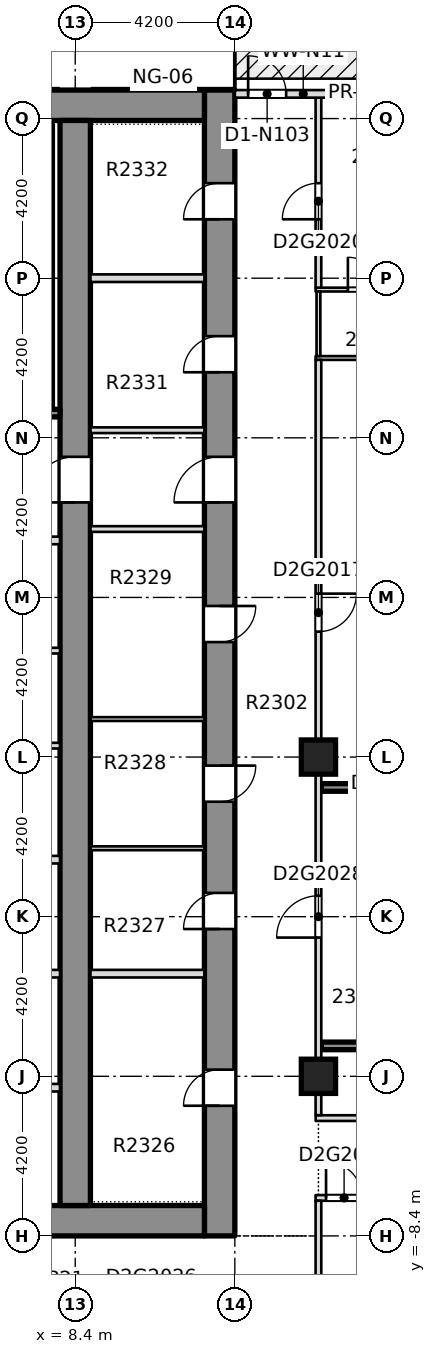
"""IFC4 building model, lengths in metres.
Left out: names, types, materials, properties, quantities, classifications, styles, units other than length and angle.
Written with IfcOpenShell. Run it as: python <this file> out.ifc"""

import sys

from ifc_helpers import new_model, si_unit, direction, frame, frame_2d, origin, origin_2d, place, context, subcontext, project, spatial, rectangle, extrude, element, fill, save


model = new_model("IFC4")
c1 = context("Model", 3, precision=1e-05, world=origin(), true_north=direction((0.0, 1.0)))
c2 = subcontext(c1, "Body", "Model", "MODEL_VIEW")
j1 = project(units=[si_unit("LENGTHUNIT", "METRE"), si_unit("PLANEANGLEUNIT", "RADIAN")], contexts=[c1])
p1 = place(None, origin())
s1 = spatial("IfcSite", under=j1, at=p1, CompositionType="ELEMENT")
p2 = place(p1, origin())
s2 = spatial("IfcBuilding", under=s1, at=p2, CompositionType="ELEMENT")
p3 = place(p2, frame((0.0, 0.0, 94.2)))
s3 = spatial("IfcBuildingStorey", under=s2, at=p3, CompositionType="ELEMENT", Elevation=94.2)
p4 = place(p3, frame((12.2, -8.4, -0.32), z_axis=(0.0, 0.0, 1.0), x_axis=(0.0, 1.0, 0.0)))
e1 = element("IfcWall", 1, at=p4, inside=s3, PredefinedType="SHEAR", context=c2, shape_type="SweptSolid", body=[
    extrude(rectangle(XDim=30.15, YDim=0.8, at=frame_2d((15.075, 0.0))), origin(), (0.0, 0.0, 1.0), 3.45),
])
p5 = place(p4, frame((3.425, 0.0, 0.32)))
e2 = element("IfcOpeningElement", 2, at=p5, cuts=e1, PredefinedType="OPENING", context=c2, shape_type="SweptSolid", body=[
    extrude(rectangle(XDim=0.95, YDim=2.1, at=frame_2d((0.475, 1.05))), frame((0.0, 0.41, 0.0), z_axis=(0.0, -1.0, 0.0), x_axis=(1.0, 0.0, 0.0)), (0.0, 0.0, 1.0), 0.82),
])
p6 = place(p4, frame((8.075, 0.0, 0.32)))
e3 = element("IfcOpeningElement", 3, at=p6, cuts=e1, PredefinedType="OPENING", context=c2, shape_type="SweptSolid", body=[
    extrude(rectangle(XDim=0.95, YDim=2.1, at=frame_2d((0.475, 1.05))), frame((0.0, 0.41, 0.0), z_axis=(0.0, -1.0, 0.0), x_axis=(1.0, 0.0, 0.0)), (0.0, 0.0, 1.0), 0.82),
])
p7 = place(p4, frame((11.425, 0.0, 0.32)))
e4 = element("IfcOpeningElement", 4, at=p7, cuts=e1, PredefinedType="OPENING", context=c2, shape_type="SweptSolid", body=[
    extrude(rectangle(XDim=0.95, YDim=2.1, at=frame_2d((0.475, 1.05))), frame((0.0, 0.41, 0.0), z_axis=(0.0, -1.0, 0.0), x_axis=(1.0, 0.0, 0.0)), (0.0, 0.0, 1.0), 0.82),
])
p8 = place(p4, frame((15.625, 0.0, 0.32)))
e5 = element("IfcOpeningElement", 5, at=p8, cuts=e1, PredefinedType="OPENING", context=c2, shape_type="SweptSolid", body=[
    extrude(rectangle(XDim=0.95, YDim=2.1, at=frame_2d((0.475, 1.05))), frame((0.0, 0.41, 0.0), z_axis=(0.0, -1.0, 0.0), x_axis=(1.0, 0.0, 0.0)), (0.0, 0.0, 1.0), 0.82),
])
p9 = place(p4, frame((22.725, 0.0, 0.32)))
e6 = element("IfcOpeningElement", 6, at=p9, cuts=e1, PredefinedType="OPENING", context=c2, shape_type="SweptSolid", body=[
    extrude(rectangle(XDim=0.95, YDim=2.1, at=frame_2d((0.475, 1.05))), frame((0.0, 0.41, 0.0), z_axis=(0.0, -1.0, 0.0), x_axis=(1.0, 0.0, 0.0)), (0.0, 0.0, 1.0), 0.82),
])
p10 = place(p4, frame((26.75, 0.0, 0.32)))
e7 = element("IfcOpeningElement", 7, at=p10, cuts=e1, PredefinedType="OPENING", context=c2, shape_type="SweptSolid", body=[
    extrude(rectangle(XDim=0.95, YDim=2.1, at=frame_2d((0.475, 1.05))), frame((0.0, 0.41, 0.0), z_axis=(0.0, -1.0, 0.0), x_axis=(1.0, 0.0, 0.0)), (0.0, 0.0, 1.0), 0.82),
])
p11 = place(p4, frame((19.3, 0.0, 0.32)))
e8 = element("IfcOpeningElement", 8, at=p11, cuts=e1, PredefinedType="OPENING", context=c2, shape_type="SweptSolid", body=[
    extrude(rectangle(XDim=1.2, YDim=2.1, at=frame_2d((0.6, 1.05))), frame((0.0, 0.41, 0.0), z_axis=(0.0, -1.0, 0.0), x_axis=(1.0, 0.0, 0.0)), (0.0, 0.0, 1.0), 0.82),
])
p12 = place(p3, frame((-11.8, -8.0, -0.32), z_axis=(0.0, 0.0, 1.0), x_axis=(1.0, 0.0, 0.0)))
e9 = element("IfcWall", 9, at=p12, inside=s3, PredefinedType="SHEAR", context=c2, shape_type="SweptSolid", body=[
    extrude(rectangle(XDim=23.6, YDim=0.8, at=frame_2d((11.8, 0.0))), origin(), (0.0, 0.0, 1.0), 3.45),
])
p13 = place(p12, frame((7.05, 0.0, 0.32)))
e10 = element("IfcOpeningElement", 10, at=p13, cuts=e9, PredefinedType="OPENING", context=c2, shape_type="SweptSolid", body=[
    extrude(rectangle(XDim=1.8, YDim=2.1, at=frame_2d((0.9, 1.05))), frame((0.0, 0.41, 0.0), z_axis=(0.0, -1.0, 0.0), x_axis=(1.0, 0.0, 0.0)), (0.0, 0.0, 1.0), 0.82),
])
p14 = place(p12, frame((14.75, 0.0, 0.32)))
e11 = element("IfcOpeningElement", 11, at=p14, cuts=e9, PredefinedType="OPENING", context=c2, shape_type="SweptSolid", body=[
    extrude(rectangle(XDim=1.8, YDim=2.1, at=frame_2d((0.9, 1.05))), frame((0.0, 0.41, 0.0), z_axis=(0.0, -1.0, 0.0), x_axis=(1.0, 0.0, 0.0)), (0.0, 0.0, 1.0), 0.82),
])
p15 = place(p3, frame((-11.8, 21.35, -0.32), z_axis=(0.0, 0.0, 1.0), x_axis=(1.0, 0.0, 0.0)))
e12 = element("IfcWall", 12, at=p15, inside=s3, PredefinedType="SHEAR", context=c2, shape_type="SweptSolid", body=[
    extrude(rectangle(XDim=23.6, YDim=0.8, at=frame_2d((11.8, 0.0))), origin(), (0.0, 0.0, 1.0), 3.45),
])
p16 = place(p3, frame((8.4, -7.6, -0.32), z_axis=(0.0, 0.0, 1.0), x_axis=(0.0, 1.0, 0.0)))
e13 = element("IfcWall", 13, at=p16, inside=s3, PredefinedType="SHEAR", context=c2, shape_type="SweptSolid", body=[
    extrude(rectangle(XDim=28.55, YDim=0.8, at=frame_2d((14.275, 0.0))), origin(), (0.0, 0.0, 1.0), 3.45),
])
p17 = place(p16, frame((18.5, 0.0, 0.32)))
e14 = element("IfcOpeningElement", 14, at=p17, cuts=e13, PredefinedType="OPENING", context=c2, shape_type="SweptSolid", body=[
    extrude(rectangle(XDim=1.2, YDim=2.1, at=frame_2d((0.6, 1.05))), frame((0.0, 0.41, 0.0), z_axis=(0.0, -1.0, 0.0), x_axis=(1.0, 0.0, 0.0)), (0.0, 0.0, 1.0), 0.82),
])
for number, where, z_axis, x_axis in (
    (15, (14.8, -4.2, -0.32), (0.0, 0.0, 1.0), (1.0, 0.0, 0.0)),
    (16, (14.8, 4.2, -0.32), (0.0, 0.0, 1.0), (1.0, 0.0, 0.0)),
):
    element("IfcColumn", number, at=place(p3, frame(where, z_axis=z_axis, x_axis=x_axis)), inside=s3, PredefinedType="COLUMN", context=c2, shape_type="SweptSolid", body=[
        extrude(rectangle(XDim=0.9, YDim=0.9, at=origin_2d()), origin(), (0.0, 0.0, 1.0), 3.45),
    ])
p18 = place(p3, frame((14.725, -7.4, 0.0), z_axis=(0.0, 0.0, 1.0), x_axis=(1.0, 0.0, 0.0)))
e17 = element("IfcWall", 17, at=p18, inside=s3, PredefinedType="PARTITIONING", context=c2, shape_type="SweptSolid", body=[
    extrude(rectangle(XDim=11.025, YDim=0.15, at=frame_2d((5.512, 0.0))), origin(), (0.0, 0.0, 1.0), 3.13),
])
p19 = place(p18, frame((0.275, 0.0, 0.0)))
e18 = element("IfcOpeningElement", 18, at=p19, cuts=e17, PredefinedType="OPENING", context=c2, shape_type="SweptSolid", body=[
    extrude(rectangle(XDim=0.95, YDim=2.1, at=frame_2d((0.475, 1.05))), frame((0.0, 0.085, 0.0), z_axis=(0.0, -1.0, 0.0), x_axis=(1.0, 0.0, 0.0)), (0.0, 0.0, 1.0), 0.17),
])
p20 = place(p3, frame((14.727, -5.3, 0.0), z_axis=(0.0, 0.0, 1.0), x_axis=(1.0, 0.0, 0.0)))
e19 = element("IfcWall", 19, at=p20, inside=s3, PredefinedType="PARTITIONING", context=c2, shape_type="SweptSolid", body=[
    extrude(rectangle(XDim=11.023, YDim=0.15, at=frame_2d((5.511, 0.0))), origin(), (0.0, 0.0, 1.0), 3.13),
])
p21 = place(p3, frame((14.877, -3.4, 0.0), z_axis=(0.0, 0.0, 1.0), x_axis=(1.0, 0.0, 0.0)))
e20 = element("IfcWall", 20, at=p21, inside=s3, PredefinedType="SOLIDWALL", context=c2, shape_type="SweptSolid", body=[
    extrude(rectangle(XDim=5.571, YDim=0.2, at=frame_2d((2.786, 0.0))), origin(), (0.0, 0.0, 1.0), 3.13),
])
p22 = place(p3, frame((14.875, 3.4, 0.0), z_axis=(0.0, 0.0, 1.0), x_axis=(1.0, 0.0, 0.0)))
e21 = element("IfcWall", 21, at=p22, inside=s3, PredefinedType="SOLIDWALL", context=c2, shape_type="SweptSolid", body=[
    extrude(rectangle(XDim=5.575, YDim=0.2, at=frame_2d((2.788, 0.0))), origin(), (0.0, 0.0, 1.0), 3.13),
])
p23 = place(p3, frame((14.725, 14.7, 0.0), z_axis=(0.0, 0.0, 1.0), x_axis=(1.0, 0.0, 0.0)))
e22 = element("IfcWall", 22, at=p23, inside=s3, PredefinedType="PARTITIONING", context=c2, shape_type="SweptSolid", body=[
    extrude(rectangle(XDim=2.525, YDim=0.1, at=frame_2d((1.262, 0.0))), origin(), (0.0, 0.0, 1.0), 3.13),
])
p24 = place(p3, frame((14.725, 16.5, 0.0), z_axis=(0.0, 0.0, 1.0), x_axis=(1.0, 0.0, 0.0)))
e23 = element("IfcWall", 23, at=p24, inside=s3, PredefinedType="PARTITIONING", context=c2, shape_type="SweptSolid", body=[
    extrude(rectangle(XDim=2.525, YDim=0.1, at=frame_2d((1.262, 0.0))), origin(), (0.0, 0.0, 1.0), 3.13),
])
p25 = place(p24, frame((0.85, 0.0, 0.0)))
e24 = element("IfcOpeningElement", 24, at=p25, cuts=e23, PredefinedType="OPENING", context=c2, shape_type="SweptSolid", body=[
    extrude(rectangle(XDim=0.85, YDim=2.1, at=frame_2d((0.425, 1.05))), frame((0.0, 0.06, 0.0), z_axis=(0.0, -1.0, 0.0), x_axis=(1.0, 0.0, 0.0)), (0.0, 0.0, 1.0), 0.12),
])
p26 = place(p3, frame((14.8, -10.6, 0.0), z_axis=(0.0, 0.0, 1.0), x_axis=(0.0, 1.0, 0.0)))
e25 = element("IfcWall", 25, at=p26, inside=s3, PredefinedType="PARTITIONING", context=c2, shape_type="SweptSolid", body=[
    extrude(rectangle(XDim=3.125, YDim=0.15, at=frame_2d((1.562, 0.0))), origin(), (0.0, 0.0, 1.0), 3.13),
])
p27 = place(p3, frame((14.8, -5.223, 0.0), z_axis=(0.0, 0.0, 1.0), x_axis=(0.0, 1.0, 0.0)))
e26 = element("IfcWall", 26, at=p27, inside=s3, PredefinedType="PARTITIONING", context=c2, shape_type="SweptSolid", body=[
    extrude(rectangle(XDim=19.873, YDim=0.15, at=frame_2d((9.937, 0.0))), origin(), (0.0, 0.0, 1.0), 3.13),
])
p28 = place(p27, frame((12.723, 0.0, 0.0)))
e27 = element("IfcOpeningElement", 27, at=p28, cuts=e26, PredefinedType="OPENING", context=c2, shape_type="SweptSolid", body=[
    extrude(rectangle(XDim=1.0, YDim=2.1, at=frame_2d((0.5, 1.05))), frame((0.0, 0.085, 0.0), z_axis=(0.0, -1.0, 0.0), x_axis=(1.0, 0.0, 0.0)), (0.0, 0.0, 1.0), 0.17),
])
p29 = place(p27, frame((4.673, 0.0, 0.0)))
e28 = element("IfcOpeningElement", 28, at=p29, cuts=e26, PredefinedType="OPENING", context=c2, shape_type="SweptSolid", body=[
    extrude(rectangle(XDim=1.1, YDim=2.1, at=frame_2d((0.55, 1.05))), frame((0.0, 0.085, 0.0), z_axis=(0.0, -1.0, 0.0), x_axis=(1.0, 0.0, 0.0)), (0.0, 0.0, 1.0), 0.17),
])
p30 = place(p3, frame((14.8, 14.75, 0.0), z_axis=(0.0, 0.0, 1.0), x_axis=(0.0, 1.0, 0.0)))
e29 = element("IfcWall", 29, at=p30, inside=s3, PredefinedType="PARTITIONING", context=c2, shape_type="SweptSolid", body=[
    extrude(rectangle(XDim=1.7, YDim=0.1, at=frame_2d((0.85, 0.0))), origin(), (0.0, 0.0, 1.0), 3.13),
])
p31 = place(p3, frame((14.8, 16.55, 0.0), z_axis=(0.0, 0.0, 1.0), x_axis=(0.0, 1.0, 0.0)))
e30 = element("IfcWall", 30, at=p31, inside=s3, PredefinedType="PARTITIONING", context=c2, shape_type="SweptSolid", body=[
    extrude(rectangle(XDim=5.0, YDim=0.15, at=frame_2d((2.5, 0.0))), origin(), (0.0, 0.0, 1.0), 3.13),
])
p32 = place(p31, frame((1.8, 0.0, 0.0)))
e31 = element("IfcOpeningElement", 31, at=p32, cuts=e30, PredefinedType="OPENING", context=c2, shape_type="SweptSolid", body=[
    extrude(rectangle(XDim=0.95, YDim=2.1, at=frame_2d((0.475, 1.05))), frame((0.0, 0.085, 0.0), z_axis=(0.0, -1.0, 0.0), x_axis=(1.0, 0.0, 0.0)), (0.0, 0.0, 1.0), 0.17),
])
p33 = place(p3, frame((16.2, 21.65, 0.0), z_axis=(0.0, 0.0, 1.0), x_axis=(-1.0, 0.0, 0.0)))
e32 = element("IfcWall", 32, at=p33, inside=s3, PredefinedType="STANDARD", context=c2, shape_type="SweptSolid", body=[
    extrude(rectangle(XDim=3.6, YDim=0.2, at=frame_2d((1.8, 0.0))), origin(), (0.0, 0.0, 1.0), 3.13),
])
p34 = place(p33, frame((2.25, 0.0, 0.0)))
e33 = element("IfcOpeningElement", 33, at=p34, cuts=e32, PredefinedType="OPENING", context=c2, shape_type="SweptSolid", body=[
    extrude(rectangle(XDim=1.0, YDim=2.4, at=frame_2d((0.5, 1.2))), frame((0.0, 0.11, 0.0), z_axis=(0.0, -1.0, 0.0), x_axis=(1.0, 0.0, 0.0)), (0.0, 0.0, 1.0), 0.22),
])
for number, where, z_axis, x_axis in (
    (34, (5.575, -4.5, 0.0), (0.0, 0.0, 1.0), (1.0, 0.0, 0.0)),
    (35, (5.575, -1.5, 0.0), (0.0, 0.0, 1.0), (1.0, 0.0, 0.0)),
    (36, (5.575, 1.5, 0.0), (0.0, 0.0, 1.0), (1.0, 0.0, 0.0)),
):
    element("IfcWall", number, at=place(p3, frame(where, z_axis=z_axis, x_axis=x_axis)), inside=s3, PredefinedType="PARTITIONING", context=c2, shape_type="SweptSolid", body=[
        extrude(rectangle(XDim=2.424, YDim=0.2, at=frame_2d((1.212, 0.0))), origin(), (0.0, 0.0, 1.0), 3.13),
    ])
p35 = place(p3, frame((5.425, 4.5, 0.0), z_axis=(0.0, 0.0, 1.0), x_axis=(1.0, 0.0, 0.0)))
e37 = element("IfcWall", 37, at=p35, inside=s3, PredefinedType="PARTITIONING", context=c2, shape_type="SweptSolid", body=[
    extrude(rectangle(XDim=2.574, YDim=0.15, at=frame_2d((1.287, 0.0))), origin(), (0.0, 0.0, 1.0), 3.13),
])
p36 = place(p3, frame((-7.999, 7.0, 0.0), z_axis=(0.0, 0.0, 1.0), x_axis=(1.0, 0.0, 0.0)))
e38 = element("IfcWall", 38, at=p36, inside=s3, PredefinedType="PARTITIONING", context=c2, shape_type="SweptSolid", body=[
    extrude(rectangle(XDim=15.998, YDim=0.15, at=frame_2d((7.999, 0.0))), origin(), (0.0, 0.0, 1.0), 3.13),
])
p37 = place(p36, frame((7.299, 0.0, 0.0)))
e39 = element("IfcOpeningElement", 39, at=p37, cuts=e38, PredefinedType="OPENING", context=c2, shape_type="SweptSolid", body=[
    extrude(rectangle(XDim=1.4, YDim=2.1, at=frame_2d((0.7, 1.05))), frame((0.0, 0.085, 0.0), z_axis=(0.0, -1.0, 0.0), x_axis=(1.0, 0.0, 0.0)), (0.0, 0.0, 1.0), 0.17),
])
p38 = place(p3, frame((3.6, 9.9, 0.0), z_axis=(0.0, 0.0, 1.0), x_axis=(1.0, 0.0, 0.0)))
e40 = element("IfcWall", 40, at=p38, inside=s3, PredefinedType="PARTITIONING", context=c2, shape_type="SweptSolid", body=[
    extrude(rectangle(XDim=4.399, YDim=0.2, at=frame_2d((2.199, 0.0))), origin(), (0.0, 0.0, 1.0), 3.13),
])
p39 = place(p38, frame((2.25, 0.0, 0.0)))
e41 = element("IfcOpeningElement", 41, at=p39, cuts=e40, PredefinedType="OPENING", context=c2, shape_type="SweptSolid", body=[
    extrude(rectangle(XDim=1.1, YDim=2.1, at=frame_2d((0.55, 1.05))), frame((0.0, 0.11, 0.0), z_axis=(0.0, -1.0, 0.0), x_axis=(1.0, 0.0, 0.0)), (0.0, 0.0, 1.0), 0.22),
])
p40 = place(p3, frame((3.425, 13.25, 0.0), z_axis=(0.0, 0.0, 1.0), x_axis=(1.0, 0.0, 0.0)))
e42 = element("IfcWall", 42, at=p40, inside=s3, PredefinedType="SOLIDWALL", context=c2, shape_type="SweptSolid", body=[
    extrude(rectangle(XDim=4.574, YDim=0.2, at=frame_2d((2.287, 0.0))), origin(), (0.0, 0.0, 1.0), 3.13),
])
p41 = place(p40, frame((1.825, 0.0, 0.0)))
e43 = element("IfcOpeningElement", 43, at=p41, cuts=e42, PredefinedType="OPENING", context=c2, shape_type="SweptSolid", body=[
    extrude(rectangle(XDim=1.2, YDim=2.1, at=frame_2d((0.6, 1.05))), frame((0.0, 0.11, 0.0), z_axis=(0.0, -1.0, 0.0), x_axis=(1.0, 0.0, 0.0)), (0.0, 0.0, 1.0), 0.22),
])
p42 = place(p3, frame((8.801, -1.5, 0.0), z_axis=(0.0, 0.0, 1.0), x_axis=(1.0, 0.0, 0.0)))
e44 = element("IfcWall", 44, at=p42, inside=s3, PredefinedType="PARTITIONING", context=c2, shape_type="SweptSolid", body=[
    extrude(rectangle(XDim=2.998, YDim=0.2, at=frame_2d((1.499, 0.0))), origin(), (0.0, 0.0, 1.0), 3.13),
])
for number, where, z_axis, x_axis in (
    (45, (8.801, 1.8, 0.0), (0.0, 0.0, 1.0), (1.0, 0.0, 0.0)),
    (46, (8.801, 5.2, 0.0), (0.0, 0.0, 1.0), (1.0, 0.0, 0.0)),
):
    element("IfcWall", number, at=place(p3, frame(where, z_axis=z_axis, x_axis=x_axis)), inside=s3, PredefinedType="PARTITIONING", context=c2, shape_type="SweptSolid", body=[
        extrude(rectangle(XDim=2.998, YDim=0.1, at=frame_2d((1.499, 0.0))), origin(), (0.0, 0.0, 1.0), 3.13),
    ])
for number, where, z_axis, x_axis in (
    (47, (8.801, 10.2, 0.0), (0.0, 0.0, 1.0), (1.0, 0.0, 0.0)),
    (48, (8.801, 12.8, 0.0), (0.0, 0.0, 1.0), (1.0, 0.0, 0.0)),
):
    element("IfcWall", number, at=place(p3, frame(where, z_axis=z_axis, x_axis=x_axis)), inside=s3, PredefinedType="PARTITIONING", context=c2, shape_type="SweptSolid", body=[
        extrude(rectangle(XDim=2.998, YDim=0.15, at=frame_2d((1.499, 0.0))), origin(), (0.0, 0.0, 1.0), 3.13),
    ])
p43 = place(p3, frame((8.801, 16.8, 0.0), z_axis=(0.0, 0.0, 1.0), x_axis=(1.0, 0.0, 0.0)))
e49 = element("IfcWall", 49, at=p43, inside=s3, PredefinedType="PARTITIONING", context=c2, shape_type="SweptSolid", body=[
    extrude(rectangle(XDim=2.998, YDim=0.2, at=frame_2d((1.499, 0.0))), origin(), (0.0, 0.0, 1.0), 3.13),
])
p44 = place(p19, origin())
e50 = element("IfcDoor", 50, at=p44, inside=s3, OperationType="SINGLE_SWING_RIGHT", PredefinedType="DOOR", context=c2, shape_type="SweptSolid", body=[
    extrude(rectangle(XDim=0.95, YDim=2.1, at=frame_2d((0.475, 1.05))), frame((0.0, 0.025, 0.0), z_axis=(0.0, -1.0, 0.0), x_axis=(1.0, 0.0, 0.0)), (0.0, 0.0, 1.0), 0.05),
])
fill(e18, e50)
p45 = place(p28, origin())
e51 = element("IfcDoor", 51, at=p45, inside=s3, OperationType="SINGLE_SWING_LEFT", PredefinedType="DOOR", context=c2, shape_type="SweptSolid", body=[
    extrude(rectangle(XDim=1.0, YDim=2.1, at=frame_2d((0.5, 1.05))), frame((0.0, 0.025, 0.0), z_axis=(0.0, -1.0, 0.0), x_axis=(1.0, 0.0, 0.0)), (0.0, 0.0, 1.0), 0.05),
])
fill(e27, e51)
p46 = place(p32, origin())
e52 = element("IfcDoor", 52, at=p46, inside=s3, OperationType="SINGLE_SWING_LEFT", PredefinedType="DOOR", context=c2, shape_type="SweptSolid", body=[
    extrude(rectangle(XDim=0.95, YDim=2.1, at=frame_2d((0.475, 1.05))), frame((0.0, 0.025, 0.0), z_axis=(0.0, -1.0, 0.0), x_axis=(1.0, 0.0, 0.0)), (0.0, 0.0, 1.0), 0.05),
])
fill(e31, e52)
p47 = place(p25, origin())
e53 = element("IfcDoor", 53, at=p47, inside=s3, OperationType="SINGLE_SWING_RIGHT", PredefinedType="DOOR", context=c2, shape_type="SweptSolid", body=[
    extrude(rectangle(XDim=0.85, YDim=2.1, at=frame_2d((0.425, 1.05))), frame((0.0, 0.025, 0.0), z_axis=(0.0, -1.0, 0.0), x_axis=(1.0, 0.0, 0.0)), (0.0, 0.0, 1.0), 0.05),
])
fill(e24, e53)
p48 = place(p29, origin())
e54 = element("IfcDoor", 54, at=p48, inside=s3, OperationType="SINGLE_SWING_RIGHT", PredefinedType="DOOR", context=c2, shape_type="SweptSolid", body=[
    extrude(rectangle(XDim=1.1, YDim=2.1, at=frame_2d((0.55, 1.05))), frame((0.0, 0.025, 0.0), z_axis=(0.0, -1.0, 0.0), x_axis=(1.0, 0.0, 0.0)), (0.0, 0.0, 1.0), 0.05),
])
fill(e28, e54)
p49 = place(p34, origin())
e55 = element("IfcDoor", 55, at=p49, inside=s3, OperationType="SINGLE_SWING_LEFT", PredefinedType="DOOR", context=c2, shape_type="SweptSolid", body=[
    extrude(rectangle(XDim=1.0, YDim=2.4, at=frame_2d((0.5, 1.2))), frame((0.0, 0.025, 0.0), z_axis=(0.0, -1.0, 0.0), x_axis=(1.0, 0.0, 0.0)), (0.0, 0.0, 1.0), 0.05),
])
fill(e33, e55)
p50 = place(p5, origin())
e56 = element("IfcDoor", 56, at=p50, inside=s3, OperationType="SINGLE_SWING_LEFT", PredefinedType="DOOR", context=c2, shape_type="SweptSolid", body=[
    extrude(rectangle(XDim=0.95, YDim=2.1, at=frame_2d((0.475, 1.05))), frame((0.0, 0.025, 0.0), z_axis=(0.0, -1.0, 0.0), x_axis=(1.0, 0.0, 0.0)), (0.0, 0.0, 1.0), 0.05),
])
fill(e2, e56)
p51 = place(p6, origin())
e57 = element("IfcDoor", 57, at=p51, inside=s3, OperationType="SINGLE_SWING_LEFT", PredefinedType="DOOR", context=c2, shape_type="SweptSolid", body=[
    extrude(rectangle(XDim=0.95, YDim=2.1, at=frame_2d((0.475, 1.05))), frame((0.0, 0.025, 0.0), z_axis=(0.0, -1.0, 0.0), x_axis=(1.0, 0.0, 0.0)), (0.0, 0.0, 1.0), 0.05),
])
fill(e3, e57)
p52 = place(p7, origin())
e58 = element("IfcDoor", 58, at=p52, inside=s3, OperationType="SINGLE_SWING_LEFT", PredefinedType="DOOR", context=c2, shape_type="SweptSolid", body=[
    extrude(rectangle(XDim=0.95, YDim=2.1, at=frame_2d((0.475, 1.05))), frame((0.0, 0.025, 0.0), z_axis=(0.0, -1.0, 0.0), x_axis=(1.0, 0.0, 0.0)), (0.0, 0.0, 1.0), 0.05),
])
fill(e4, e58)
p53 = place(p8, origin())
e59 = element("IfcDoor", 59, at=p53, inside=s3, OperationType="SINGLE_SWING_LEFT", PredefinedType="DOOR", context=c2, shape_type="SweptSolid", body=[
    extrude(rectangle(XDim=0.95, YDim=2.1, at=frame_2d((0.475, 1.05))), frame((0.0, 0.025, 0.0), z_axis=(0.0, -1.0, 0.0), x_axis=(1.0, 0.0, 0.0)), (0.0, 0.0, 1.0), 0.05),
])
fill(e5, e59)
p54 = place(p9, origin())
e60 = element("IfcDoor", 60, at=p54, inside=s3, OperationType="SINGLE_SWING_LEFT", PredefinedType="DOOR", context=c2, shape_type="SweptSolid", body=[
    extrude(rectangle(XDim=0.95, YDim=2.1, at=frame_2d((0.475, 1.05))), frame((0.0, 0.025, 0.0), z_axis=(0.0, -1.0, 0.0), x_axis=(1.0, 0.0, 0.0)), (0.0, 0.0, 1.0), 0.05),
])
fill(e6, e60)
p55 = place(p10, origin())
e61 = element("IfcDoor", 61, at=p55, inside=s3, OperationType="SINGLE_SWING_LEFT", PredefinedType="DOOR", context=c2, shape_type="SweptSolid", body=[
    extrude(rectangle(XDim=0.95, YDim=2.1, at=frame_2d((0.475, 1.05))), frame((0.0, 0.025, 0.0), z_axis=(0.0, -1.0, 0.0), x_axis=(1.0, 0.0, 0.0)), (0.0, 0.0, 1.0), 0.05),
])
fill(e7, e61)
p56 = place(p11, origin())
e62 = element("IfcDoor", 62, at=p56, inside=s3, OperationType="SINGLE_SWING_LEFT", PredefinedType="DOOR", context=c2, shape_type="SweptSolid", body=[
    extrude(rectangle(XDim=1.2, YDim=2.1, at=frame_2d((0.6, 1.05))), frame((0.0, 0.025, 0.0), z_axis=(0.0, -1.0, 0.0), x_axis=(1.0, 0.0, 0.0)), (0.0, 0.0, 1.0), 0.05),
])
fill(e8, e62)
p57 = place(p17, origin())
e63 = element("IfcDoor", 63, at=p57, inside=s3, OperationType="SINGLE_SWING_LEFT", PredefinedType="DOOR", context=c2, shape_type="SweptSolid", body=[
    extrude(rectangle(XDim=1.2, YDim=2.1, at=frame_2d((0.6, 1.05))), frame((0.0, 0.025, 0.0), z_axis=(0.0, -1.0, 0.0), x_axis=(1.0, 0.0, 0.0)), (0.0, 0.0, 1.0), 0.05),
])
fill(e14, e63)
save(model, sys.argv[1])
